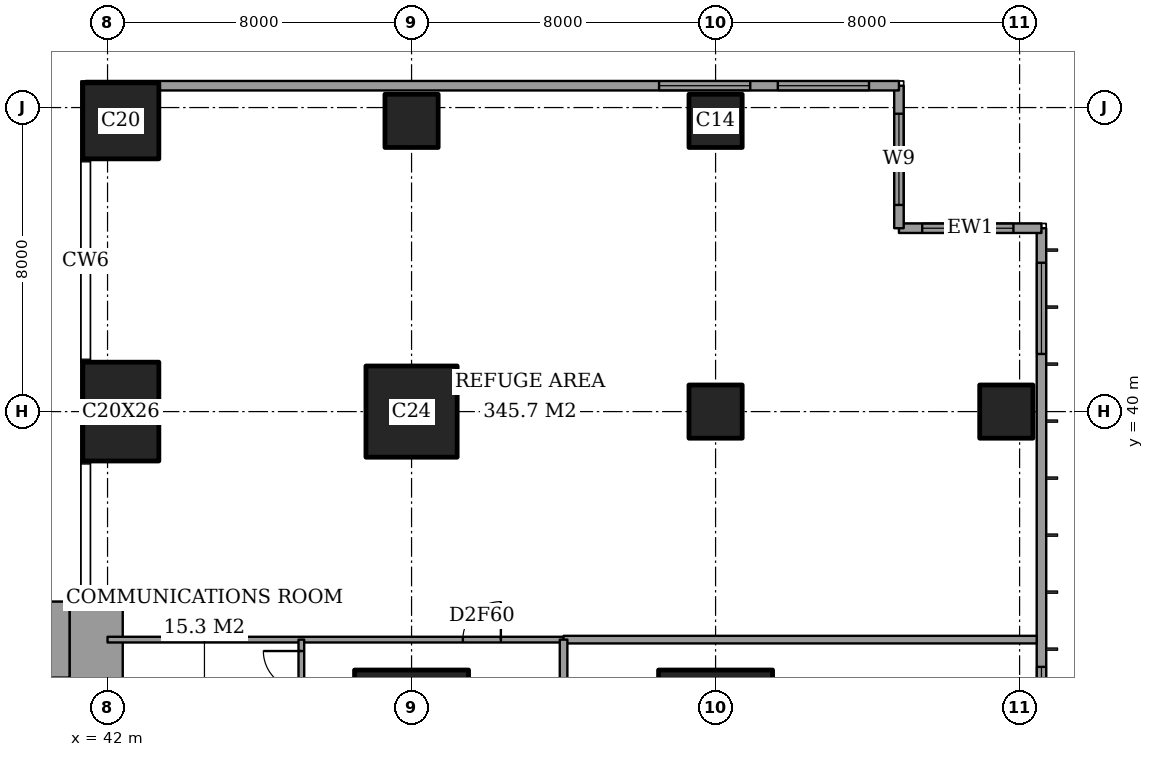
"""IFC4 building model, lengths in metres.
Left out: names, types, materials, properties, quantities, classifications, styles, units other than length and angle.
Written with IfcOpenShell. Run it as: python <this file> out.ifc"""

import sys

from ifc_helpers import new_model, si_unit, direction, frame, frame_2d, origin, origin_2d, place, context, subcontext, project, spatial, rectangle, extrude, element, fill, save


model = new_model("IFC4")
c1 = context("Model", 3, precision=1e-05, world=origin(), true_north=direction((0.0, 1.0)))
c2 = subcontext(c1, "Body", "Model", "MODEL_VIEW")
j1 = project(units=[si_unit("LENGTHUNIT", "METRE"), si_unit("PLANEANGLEUNIT", "RADIAN")], contexts=[c1])
p1 = place(None, origin())
s1 = spatial("IfcSite", under=j1, at=p1, CompositionType="ELEMENT")
p2 = place(p1, origin())
s2 = spatial("IfcBuilding", under=s1, at=p2, CompositionType="ELEMENT")
p3 = place(p2, frame((0.0, 0.0, 277.2)))
s3 = spatial("IfcBuildingStorey", under=s2, at=p3, CompositionType="ELEMENT", Elevation=277.2)
p4 = place(p3, frame((42.35, 40.0, 0.0), z_axis=(0.0, 0.0, 1.0), x_axis=(1.0, 0.0, 0.0)))
e1 = element("IfcColumn", 1, at=p4, inside=s3, PredefinedType="COLUMN", context=c2, shape_type="SweptSolid", body=[
    extrude(rectangle(XDim=2.0, YDim=2.6, at=origin_2d()), origin(), (0.0, 0.0, 1.0), 5.4),
])
p5 = place(p3, frame((42.35, 47.65, 0.0), z_axis=(0.0, 0.0, 1.0), x_axis=(1.0, 0.0, 0.0)))
e2 = element("IfcColumn", 2, at=p5, inside=s3, PredefinedType="COLUMN", context=c2, shape_type="SweptSolid", body=[
    extrude(rectangle(XDim=2.0, YDim=2.0, at=origin_2d()), origin(), (0.0, 0.0, 1.0), 5.4),
])
p6 = place(p3, frame((50.0, 32.0, 0.0), z_axis=(0.0, 0.0, 1.0), x_axis=(1.0, 0.0, 0.0)))
e3 = element("IfcColumn", 3, at=p6, inside=s3, PredefinedType="COLUMN", context=c2, shape_type="SweptSolid", body=[
    extrude(rectangle(XDim=3.0, YDim=2.4, at=origin_2d()), origin(), (0.0, 0.0, 1.0), 5.4),
])
p7 = place(p3, frame((50.0, 40.0, 0.0), z_axis=(0.0, 0.0, 1.0), x_axis=(1.0, 0.0, 0.0)))
e4 = element("IfcColumn", 4, at=p7, inside=s3, PredefinedType="COLUMN", context=c2, shape_type="SweptSolid", body=[
    extrude(rectangle(XDim=2.4, YDim=2.4, at=origin_2d()), origin(), (0.0, 0.0, 1.0), 5.4),
])
p8 = place(p3, frame((50.0, 47.65, 0.0), z_axis=(0.0, 0.0, 1.0), x_axis=(1.0, 0.0, 0.0)))
e5 = element("IfcColumn", 5, at=p8, inside=s3, PredefinedType="COLUMN", context=c2, shape_type="SweptSolid", body=[
    extrude(rectangle(XDim=1.4, YDim=1.4, at=origin_2d()), origin(), (0.0, 0.0, 1.0), 5.4),
])
p9 = place(p3, frame((58.0, 32.0, 0.0), z_axis=(0.0, 0.0, 1.0), x_axis=(1.0, 0.0, 0.0)))
e6 = element("IfcColumn", 6, at=p9, inside=s3, PredefinedType="COLUMN", context=c2, shape_type="SweptSolid", body=[
    extrude(rectangle(XDim=3.0, YDim=2.4, at=origin_2d()), origin(), (0.0, 0.0, 1.0), 5.4),
])
for number, where, z_axis, x_axis in (
    (7, (58.0, 40.0, 0.0), (0.0, 0.0, 1.0), (1.0, 0.0, 0.0)),
    (8, (58.0, 47.65, 0.0), (0.0, 0.0, 1.0), (1.0, 0.0, 0.0)),
    (9, (65.65, 40.0, 0.0), (0.0, 0.0, 1.0), (1.0, 0.0, 0.0)),
):
    element("IfcColumn", number, at=place(p3, frame(where, z_axis=z_axis, x_axis=x_axis)), inside=s3, PredefinedType="COLUMN", context=c2, shape_type="SweptSolid", body=[
        extrude(rectangle(XDim=1.4, YDim=1.4, at=origin_2d()), origin(), (0.0, 0.0, 1.0), 5.4),
    ])
p10 = place(p3, frame((37.85, 34.0, 0.0), z_axis=(0.0, 0.0, 1.0), x_axis=(1.0, 0.0, 0.0)))
e10 = element("IfcWall", 10, at=p10, inside=s3, PredefinedType="SHEAR", context=c2, shape_type="SweptSolid", body=[
    extrude(rectangle(XDim=3.15, YDim=2.0, at=frame_2d((1.575, 0.0))), origin(), (0.0, 0.0, 1.0), 5.4),
])
p11 = place(p3, frame((41.7, 24.85, 0.0), z_axis=(0.0, 0.0, 1.0), x_axis=(0.0, 1.0, 0.0)))
e11 = element("IfcWall", 11, at=p11, inside=s3, PredefinedType="SHEAR", context=c2, shape_type="SweptSolid", body=[
    extrude(rectangle(XDim=10.15, YDim=1.4, at=frame_2d((5.075, 0.0))), origin(), (0.0, 0.0, 1.0), 5.4),
])
p12 = place(p3, frame((66.575, 3.175, 0.0), z_axis=(0.0, 0.0, 1.0), x_axis=(0.0, 1.0, 0.0)))
e12 = element("IfcWall", 12, at=p12, inside=s3, PredefinedType="SOLIDWALL", context=c2, shape_type="SweptSolid", body=[
    extrude(rectangle(XDim=41.65, YDim=0.25, at=frame_2d((20.825, 0.0))), origin(), (0.0, 0.0, 1.0), 5.4),
])
p13 = place(p12, frame((0.908, 0.0, 0.9)))
e13 = element("IfcOpeningElement", 13, at=p13, cuts=e12, PredefinedType="OPENING", context=c2, shape_type="SweptSolid", body=[
    extrude(rectangle(XDim=2.4, YDim=2.4, at=frame_2d((1.2, 1.2))), frame((0.0, 0.135, 0.0), z_axis=(0.0, -1.0, 0.0), x_axis=(1.0, 0.0, 0.0)), (0.0, 0.0, 1.0), 0.27),
])
p14 = place(p12, frame((11.542, 0.0, 0.9)))
e14 = element("IfcOpeningElement", 14, at=p14, cuts=e12, PredefinedType="OPENING", context=c2, shape_type="SweptSolid", body=[
    extrude(rectangle(XDim=2.4, YDim=2.4, at=frame_2d((1.2, 1.2))), frame((0.0, 0.135, 0.0), z_axis=(0.0, -1.0, 0.0), x_axis=(1.0, 0.0, 0.0)), (0.0, 0.0, 1.0), 0.27),
])
p15 = place(p12, frame((27.708, 0.0, 0.9)))
e15 = element("IfcOpeningElement", 15, at=p15, cuts=e12, PredefinedType="OPENING", context=c2, shape_type="SweptSolid", body=[
    extrude(rectangle(XDim=2.4, YDim=2.4, at=frame_2d((1.2, 1.2))), frame((0.0, 0.135, 0.0), z_axis=(0.0, -1.0, 0.0), x_axis=(1.0, 0.0, 0.0)), (0.0, 0.0, 1.0), 0.27),
])
p16 = place(p12, frame((38.342, 0.0, 0.9)))
e16 = element("IfcOpeningElement", 16, at=p16, cuts=e12, PredefinedType="OPENING", context=c2, shape_type="SweptSolid", body=[
    extrude(rectangle(XDim=2.4, YDim=2.4, at=frame_2d((1.2, 1.2))), frame((0.0, 0.135, 0.0), z_axis=(0.0, -1.0, 0.0), x_axis=(1.0, 0.0, 0.0)), (0.0, 0.0, 1.0), 0.27),
])
p17 = place(p3, frame((66.575, 44.825, 0.0), z_axis=(0.0, 0.0, 1.0), x_axis=(-1.0, 0.0, 0.0)))
e17 = element("IfcWall", 17, at=p17, inside=s3, PredefinedType="SOLIDWALL", context=c2, shape_type="SweptSolid", body=[
    extrude(rectangle(XDim=3.75, YDim=0.25, at=frame_2d((1.875, 0.0))), origin(), (0.0, 0.0, 1.0), 5.4),
])
p18 = place(p17, frame((0.738, 0.0, 0.9)))
e18 = element("IfcOpeningElement", 18, at=p18, cuts=e17, PredefinedType="OPENING", context=c2, shape_type="SweptSolid", body=[
    extrude(rectangle(XDim=2.4, YDim=2.4, at=frame_2d((1.2, 1.2))), frame((0.0, 0.135, 0.0), z_axis=(0.0, -1.0, 0.0), x_axis=(1.0, 0.0, 0.0)), (0.0, 0.0, 1.0), 0.27),
])
p19 = place(p3, frame((62.825, 44.825, 0.0), z_axis=(0.0, 0.0, 1.0), x_axis=(0.0, 1.0, 0.0)))
e19 = element("IfcWall", 19, at=p19, inside=s3, PredefinedType="SOLIDWALL", context=c2, shape_type="SweptSolid", body=[
    extrude(rectangle(XDim=3.75, YDim=0.25, at=frame_2d((1.875, 0.0))), origin(), (0.0, 0.0, 1.0), 5.4),
])
p20 = place(p19, frame((0.613, 0.0, 0.9)))
e20 = element("IfcOpeningElement", 20, at=p20, cuts=e19, PredefinedType="OPENING", context=c2, shape_type="SweptSolid", body=[
    extrude(rectangle(XDim=2.4, YDim=2.4, at=frame_2d((1.2, 1.2))), frame((0.0, 0.135, 0.0), z_axis=(0.0, -1.0, 0.0), x_axis=(1.0, 0.0, 0.0)), (0.0, 0.0, 1.0), 0.27),
])
p21 = place(p3, frame((62.825, 48.575, 0.0), z_axis=(0.0, 0.0, 1.0), x_axis=(-1.0, 0.0, 0.0)))
e21 = element("IfcWall", 21, at=p21, inside=s3, PredefinedType="SOLIDWALL", context=c2, shape_type="SweptSolid", body=[
    extrude(rectangle(XDim=21.4, YDim=0.25, at=frame_2d((10.7, 0.0))), origin(), (0.0, 0.0, 1.0), 5.4),
])
p22 = place(p21, frame((0.788, 0.0, 0.9)))
e22 = element("IfcOpeningElement", 22, at=p22, cuts=e21, PredefinedType="OPENING", context=c2, shape_type="SweptSolid", body=[
    extrude(rectangle(XDim=2.4, YDim=2.4, at=frame_2d((1.2, 1.2))), frame((0.0, 0.135, 0.0), z_axis=(0.0, -1.0, 0.0), x_axis=(1.0, 0.0, 0.0)), (0.0, 0.0, 1.0), 0.27),
])
p23 = place(p21, frame((3.913, 0.0, 0.9)))
e23 = element("IfcOpeningElement", 23, at=p23, cuts=e21, PredefinedType="OPENING", context=c2, shape_type="SweptSolid", body=[
    extrude(rectangle(XDim=2.4, YDim=2.4, at=frame_2d((1.2, 1.2))), frame((0.0, 0.135, 0.0), z_axis=(0.0, -1.0, 0.0), x_axis=(1.0, 0.0, 0.0)), (0.0, 0.0, 1.0), 0.27),
])
p24 = place(p3, frame((54.0, 34.0, 0.0), z_axis=(0.0, 0.0, 1.0), x_axis=(1.0, 0.0, 0.0)))
e24 = element("IfcWall", 24, at=p24, inside=s3, PredefinedType="PARTITIONING", context=c2, shape_type="SweptSolid", body=[
    extrude(rectangle(XDim=12.45, YDim=0.2, at=frame_2d((6.225, 0.0))), origin(), (0.0, 0.0, 1.0), 5.15),
])
p25 = place(p3, frame((42.0, 34.0, 0.0), z_axis=(0.0, 0.0, 1.0), x_axis=(1.0, 0.0, 0.0)))
e25 = element("IfcWall", 25, at=p25, inside=s3, PredefinedType="PARTITIONING", context=c2, shape_type="SweptSolid", body=[
    extrude(rectangle(XDim=12.0, YDim=0.15, at=frame_2d((6.0, 0.0))), origin(), (0.0, 0.0, 1.0), 5.15),
])
p26 = place(p25, frame((9.35, 0.0, 0.0)))
e26 = element("IfcOpeningElement", 26, at=p26, cuts=e25, PredefinedType="OPENING", context=c2, shape_type="SweptSolid", body=[
    extrude(rectangle(XDim=1.0, YDim=2.1, at=frame_2d((0.5, 1.05))), frame((0.0, 0.085, 0.0), z_axis=(0.0, -1.0, 0.0), x_axis=(1.0, 0.0, 0.0)), (0.0, 0.0, 1.0), 0.17),
])
p27 = place(p3, frame((47.1, 31.0, 0.0), z_axis=(0.0, 0.0, 1.0), x_axis=(0.0, 1.0, 0.0)))
e27 = element("IfcWall", 27, at=p27, inside=s3, PredefinedType="PARTITIONING", context=c2, shape_type="SweptSolid", body=[
    extrude(rectangle(XDim=3.0, YDim=0.15, at=frame_2d((1.5, 0.0))), origin(), (0.0, 0.0, 1.0), 5.15),
])
p28 = place(p27, frame((1.7, 0.0, 0.0)))
e28 = element("IfcOpeningElement", 28, at=p28, cuts=e27, PredefinedType="OPENING", context=c2, shape_type="SweptSolid", body=[
    extrude(rectangle(XDim=1.0, YDim=2.1, at=frame_2d((0.5, 1.05))), frame((0.0, 0.085, 0.0), z_axis=(0.0, -1.0, 0.0), x_axis=(1.0, 0.0, 0.0)), (0.0, 0.0, 1.0), 0.17),
])
p29 = place(p3, frame((54.0, 30.725, 0.0), z_axis=(0.0, 0.0, 1.0), x_axis=(0.0, 1.0, 0.0)))
e29 = element("IfcWall", 29, at=p29, inside=s3, PredefinedType="PARTITIONING", context=c2, shape_type="SweptSolid", body=[
    extrude(rectangle(XDim=3.275, YDim=0.2, at=frame_2d((1.637, 0.0))), origin(), (0.0, 0.0, 1.0), 5.15),
])
p30 = place(p15, origin())
e30 = element("IfcWindow", 30, at=p30, inside=s3, PartitioningType="SINGLE_PANEL", PredefinedType="WINDOW", context=c2, shape_type="SweptSolid", body=[
    extrude(rectangle(XDim=2.4, YDim=2.4, at=frame_2d((1.2, 1.2))), frame((0.0, 0.03, 0.0), z_axis=(0.0, -1.0, 0.0), x_axis=(1.0, 0.0, 0.0)), (0.0, 0.0, 1.0), 0.06),
])
fill(e15, e30)
p31 = place(p16, origin())
e31 = element("IfcWindow", 31, at=p31, inside=s3, PartitioningType="SINGLE_PANEL", PredefinedType="WINDOW", context=c2, shape_type="SweptSolid", body=[
    extrude(rectangle(XDim=2.4, YDim=2.4, at=frame_2d((1.2, 1.2))), frame((0.0, 0.03, 0.0), z_axis=(0.0, -1.0, 0.0), x_axis=(1.0, 0.0, 0.0)), (0.0, 0.0, 1.0), 0.06),
])
fill(e16, e31)
p32 = place(p18, origin())
e32 = element("IfcWindow", 32, at=p32, inside=s3, PartitioningType="SINGLE_PANEL", PredefinedType="WINDOW", context=c2, shape_type="SweptSolid", body=[
    extrude(rectangle(XDim=2.4, YDim=2.4, at=frame_2d((1.2, 1.2))), frame((0.0, 0.03, 0.0), z_axis=(0.0, -1.0, 0.0), x_axis=(1.0, 0.0, 0.0)), (0.0, 0.0, 1.0), 0.06),
])
fill(e18, e32)
p33 = place(p20, origin())
e33 = element("IfcWindow", 33, at=p33, inside=s3, PartitioningType="SINGLE_PANEL", PredefinedType="WINDOW", context=c2, shape_type="SweptSolid", body=[
    extrude(rectangle(XDim=2.4, YDim=2.4, at=frame_2d((1.2, 1.2))), frame((0.0, 0.03, 0.0), z_axis=(0.0, -1.0, 0.0), x_axis=(1.0, 0.0, 0.0)), (0.0, 0.0, 1.0), 0.06),
])
fill(e20, e33)
p34 = place(p22, origin())
e34 = element("IfcWindow", 34, at=p34, inside=s3, PartitioningType="SINGLE_PANEL", PredefinedType="WINDOW", context=c2, shape_type="SweptSolid", body=[
    extrude(rectangle(XDim=2.4, YDim=2.4, at=frame_2d((1.2, 1.2))), frame((0.0, 0.03, 0.0), z_axis=(0.0, -1.0, 0.0), x_axis=(1.0, 0.0, 0.0)), (0.0, 0.0, 1.0), 0.06),
])
fill(e22, e34)
p35 = place(p23, origin())
e35 = element("IfcWindow", 35, at=p35, inside=s3, PartitioningType="SINGLE_PANEL", PredefinedType="WINDOW", context=c2, shape_type="SweptSolid", body=[
    extrude(rectangle(XDim=2.4, YDim=2.4, at=frame_2d((1.2, 1.2))), frame((0.0, 0.03, 0.0), z_axis=(0.0, -1.0, 0.0), x_axis=(1.0, 0.0, 0.0)), (0.0, 0.0, 1.0), 0.06),
])
fill(e23, e35)
p36 = place(p26, origin())
e36 = element("IfcDoor", 36, at=p36, inside=s3, OperationType="SINGLE_SWING_LEFT", PredefinedType="DOOR", context=c2, shape_type="SweptSolid", body=[
    extrude(rectangle(XDim=1.0, YDim=2.1, at=frame_2d((0.5, 1.05))), frame((0.0, 0.025, 0.0), z_axis=(0.0, -1.0, 0.0), x_axis=(1.0, 0.0, 0.0)), (0.0, 0.0, 1.0), 0.05),
])
fill(e26, e36)
p37 = place(p28, origin())
e37 = element("IfcDoor", 37, at=p37, inside=s3, OperationType="SINGLE_SWING_LEFT", PredefinedType="DOOR", context=c2, shape_type="SweptSolid", body=[
    extrude(rectangle(XDim=1.0, YDim=2.1, at=frame_2d((0.5, 1.05))), frame((0.0, 0.025, 0.0), z_axis=(0.0, -1.0, 0.0), x_axis=(1.0, 0.0, 0.0)), (0.0, 0.0, 1.0), 0.05),
])
fill(e28, e37)
save(model, sys.argv[1])
